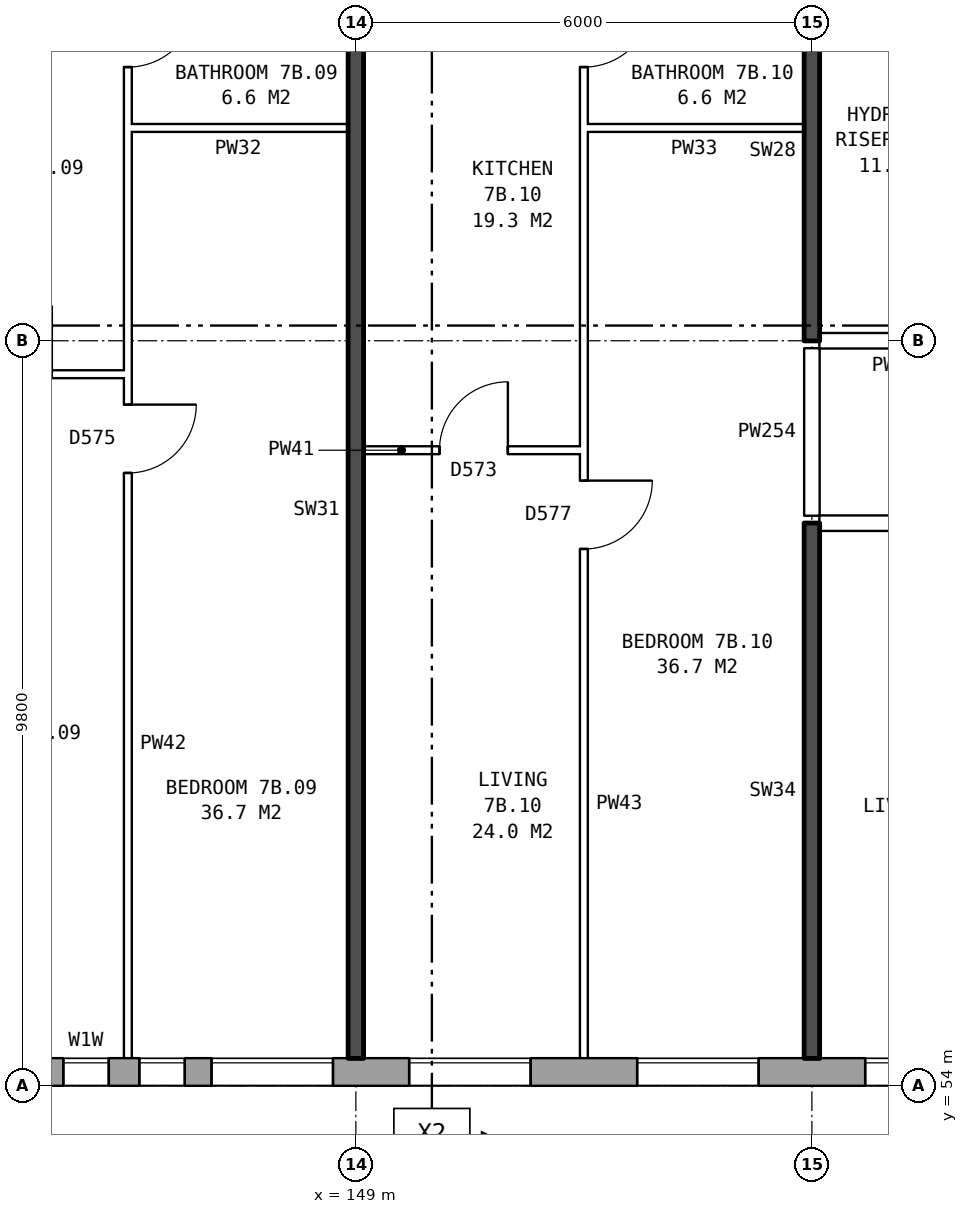
"""IFC4 building model, lengths in metres.
Left out: names, types, materials, properties, quantities, classifications, styles, units other than length and angle.
Written with IfcOpenShell. Run it as: python <this file> out.ifc"""

import sys

from ifc_helpers import new_model, si_unit, direction, frame, frame_2d, origin, place, context, subcontext, project, spatial, rectangle, extrude, element, fill, save


model = new_model("IFC4")
c1 = context("Model", 3, precision=1e-05, world=origin(), true_north=direction((0.0, 1.0)))
c2 = subcontext(c1, "Body", "Model", "MODEL_VIEW")
j1 = project(units=[si_unit("LENGTHUNIT", "METRE"), si_unit("PLANEANGLEUNIT", "RADIAN")], contexts=[c1])
p1 = place(None, origin())
s1 = spatial("IfcSite", under=j1, at=p1, CompositionType="ELEMENT")
p2 = place(p1, origin())
s2 = spatial("IfcBuilding", under=s1, at=p2, CompositionType="ELEMENT")
p3 = place(p2, frame((0.0, 0.0, 28.8)))
s3 = spatial("IfcBuildingStorey", under=s2, at=p3, CompositionType="ELEMENT", Elevation=28.8)
p4 = place(p3, frame((134.075, 54.18, 0.0), z_axis=(0.0, 0.0, 1.0), x_axis=(1.0, 0.0, 0.0)))
e1 = element("IfcWall", 1, at=p4, inside=s3, PredefinedType="STANDARD", context=c2, shape_type="SweptSolid", body=[
    extrude(rectangle(XDim=40.601, YDim=0.36, at=frame_2d((20.3, 0.0))), origin(), (0.0, 0.0, 1.0), 2.85),
])
p5 = place(p4, frame((0.625, 0.0, 0.8)))
e2 = element("IfcOpeningElement", 2, at=p5, cuts=e1, PredefinedType="OPENING", context=c2, shape_type="SweptSolid", body=[
    extrude(rectangle(XDim=1.6, YDim=1.8, at=frame_2d((0.8, 0.9))), frame((0.0, 0.19, 0.0), z_axis=(0.0, -1.0, 0.0), x_axis=(1.0, 0.0, 0.0)), (0.0, 0.0, 1.0), 0.38),
])
p6 = place(p4, frame((3.625, 0.0, 0.8)))
e3 = element("IfcOpeningElement", 3, at=p6, cuts=e1, PredefinedType="OPENING", context=c2, shape_type="SweptSolid", body=[
    extrude(rectangle(XDim=1.6, YDim=1.8, at=frame_2d((0.8, 0.9))), frame((0.0, 0.19, 0.0), z_axis=(0.0, -1.0, 0.0), x_axis=(1.0, 0.0, 0.0)), (0.0, 0.0, 1.0), 0.38),
])
p7 = place(p4, frame((6.625, 0.0, 0.8)))
e4 = element("IfcOpeningElement", 4, at=p7, cuts=e1, PredefinedType="OPENING", context=c2, shape_type="SweptSolid", body=[
    extrude(rectangle(XDim=1.6, YDim=1.8, at=frame_2d((0.8, 0.9))), frame((0.0, 0.19, 0.0), z_axis=(0.0, -1.0, 0.0), x_axis=(1.0, 0.0, 0.0)), (0.0, 0.0, 1.0), 0.38),
])
p8 = place(p4, frame((9.125, 0.0, 1.65)))
e5 = element("IfcOpeningElement", 5, at=p8, cuts=e1, PredefinedType="OPENING", context=c2, shape_type="SweptSolid", body=[
    extrude(rectangle(XDim=1.4, YDim=0.9, at=frame_2d((0.7, 0.45))), frame((0.0, 0.19, 0.0), z_axis=(0.0, -1.0, 0.0), x_axis=(1.0, 0.0, 0.0)), (0.0, 0.0, 1.0), 0.38),
])
p9 = place(p4, frame((12.075, 0.0, 0.8)))
e6 = element("IfcOpeningElement", 6, at=p9, cuts=e1, PredefinedType="OPENING", context=c2, shape_type="SweptSolid", body=[
    extrude(rectangle(XDim=0.6, YDim=0.9, at=frame_2d((0.3, 0.45))), frame((0.0, 0.19, 0.0), z_axis=(0.0, -1.0, 0.0), x_axis=(1.0, 0.0, 0.0)), (0.0, 0.0, 1.0), 0.38),
])
p10 = place(p4, frame((15.625, 0.0, 0.8)))
e7 = element("IfcOpeningElement", 7, at=p10, cuts=e1, PredefinedType="OPENING", context=c2, shape_type="SweptSolid", body=[
    extrude(rectangle(XDim=1.6, YDim=1.8, at=frame_2d((0.8, 0.9))), frame((0.0, 0.19, 0.0), z_axis=(0.0, -1.0, 0.0), x_axis=(1.0, 0.0, 0.0)), (0.0, 0.0, 1.0), 0.38),
])
p11 = place(p4, frame((18.625, 0.0, 0.8)))
e8 = element("IfcOpeningElement", 8, at=p11, cuts=e1, PredefinedType="OPENING", context=c2, shape_type="SweptSolid", body=[
    extrude(rectangle(XDim=1.6, YDim=1.8, at=frame_2d((0.8, 0.9))), frame((0.0, 0.19, 0.0), z_axis=(0.0, -1.0, 0.0), x_axis=(1.0, 0.0, 0.0)), (0.0, 0.0, 1.0), 0.38),
])
p12 = place(p4, frame((21.625, 0.0, 0.8)))
e9 = element("IfcOpeningElement", 9, at=p12, cuts=e1, PredefinedType="OPENING", context=c2, shape_type="SweptSolid", body=[
    extrude(rectangle(XDim=1.6, YDim=1.8, at=frame_2d((0.8, 0.9))), frame((0.0, 0.19, 0.0), z_axis=(0.0, -1.0, 0.0), x_axis=(1.0, 0.0, 0.0)), (0.0, 0.0, 1.0), 0.38),
])
p13 = place(p4, frame((24.625, 0.0, 0.8)))
e10 = element("IfcOpeningElement", 10, at=p13, cuts=e1, PredefinedType="OPENING", context=c2, shape_type="SweptSolid", body=[
    extrude(rectangle(XDim=1.6, YDim=1.8, at=frame_2d((0.8, 0.9))), frame((0.0, 0.19, 0.0), z_axis=(0.0, -1.0, 0.0), x_axis=(1.0, 0.0, 0.0)), (0.0, 0.0, 1.0), 0.38),
])
p14 = place(p4, frame((27.125, 0.0, 0.65)))
e11 = element("IfcOpeningElement", 11, at=p14, cuts=e1, PredefinedType="OPENING", context=c2, shape_type="SweptSolid", body=[
    extrude(rectangle(XDim=0.6, YDim=1.8, at=frame_2d((0.3, 0.9))), frame((0.0, 0.19, 0.0), z_axis=(0.0, -1.0, 0.0), x_axis=(1.0, 0.0, 0.0)), (0.0, 0.0, 1.0), 0.38),
])
p15 = place(p4, frame((30.125, 0.0, 1.6)))
e12 = element("IfcOpeningElement", 12, at=p15, cuts=e1, PredefinedType="OPENING", context=c2, shape_type="SweptSolid", body=[
    extrude(rectangle(XDim=0.6, YDim=0.9, at=frame_2d((0.3, 0.45))), frame((0.0, 0.19, 0.0), z_axis=(0.0, -1.0, 0.0), x_axis=(1.0, 0.0, 0.0)), (0.0, 0.0, 1.0), 0.38),
])
p16 = place(p4, frame((33.625, 0.0, 0.8)))
e13 = element("IfcOpeningElement", 13, at=p16, cuts=e1, PredefinedType="OPENING", context=c2, shape_type="SweptSolid", body=[
    extrude(rectangle(XDim=1.6, YDim=1.8, at=frame_2d((0.8, 0.9))), frame((0.0, 0.19, 0.0), z_axis=(0.0, -1.0, 0.0), x_axis=(1.0, 0.0, 0.0)), (0.0, 0.0, 1.0), 0.38),
])
p17 = place(p4, frame((36.625, 0.0, 0.8)))
e14 = element("IfcOpeningElement", 14, at=p17, cuts=e1, PredefinedType="OPENING", context=c2, shape_type="SweptSolid", body=[
    extrude(rectangle(XDim=1.6, YDim=1.8, at=frame_2d((0.8, 0.9))), frame((0.0, 0.19, 0.0), z_axis=(0.0, -1.0, 0.0), x_axis=(1.0, 0.0, 0.0)), (0.0, 0.0, 1.0), 0.38),
])
p18 = place(p4, frame((11.075, 0.0, 0.15)))
e15 = element("IfcOpeningElement", 15, at=p18, cuts=e1, PredefinedType="OPENING", context=c2, shape_type="SweptSolid", body=[
    extrude(rectangle(XDim=0.6, YDim=0.9, at=frame_2d((0.3, 0.45))), frame((0.0, 0.19, 0.0), z_axis=(0.0, -1.0, 0.0), x_axis=(1.0, 0.0, 0.0)), (0.0, 0.0, 1.0), 0.38),
])
p19 = place(p4, frame((13.025, 0.0, 0.8)))
e16 = element("IfcOpeningElement", 16, at=p19, cuts=e1, PredefinedType="OPENING", context=c2, shape_type="SweptSolid", body=[
    extrude(rectangle(XDim=1.6, YDim=1.8, at=frame_2d((0.8, 0.9))), frame((0.0, 0.19, 0.0), z_axis=(0.0, -1.0, 0.0), x_axis=(1.0, 0.0, 0.0)), (0.0, 0.0, 1.0), 0.38),
])
p20 = place(p4, frame((28.025, 0.0, 0.65)))
e17 = element("IfcOpeningElement", 17, at=p20, cuts=e1, PredefinedType="OPENING", context=c2, shape_type="SweptSolid", body=[
    extrude(rectangle(XDim=0.8, YDim=0.9, at=frame_2d((0.4, 0.45))), frame((0.0, 0.19, 0.0), z_axis=(0.0, -1.0, 0.0), x_axis=(1.0, 0.0, 0.0)), (0.0, 0.0, 1.0), 0.38),
])
p21 = place(p4, frame((31.075, 0.0, 0.8)))
e18 = element("IfcOpeningElement", 18, at=p21, cuts=e1, PredefinedType="OPENING", context=c2, shape_type="SweptSolid", body=[
    extrude(rectangle(XDim=1.6, YDim=1.8, at=frame_2d((0.8, 0.9))), frame((0.0, 0.19, 0.0), z_axis=(0.0, -1.0, 0.0), x_axis=(1.0, 0.0, 0.0)), (0.0, 0.0, 1.0), 0.38),
])
p22 = place(p3, frame((155.1, 61.4, 0.0), z_axis=(0.0, 0.0, 1.0), x_axis=(1.0, 0.0, 0.0)))
e19 = element("IfcWall", 19, at=p22, inside=s3, PredefinedType="PARTITIONING", context=c2, shape_type="SweptSolid", body=[
    extrude(rectangle(XDim=22.29, YDim=0.2, at=frame_2d((11.145, 0.0))), origin(), (0.0, 0.0, 1.0), 2.85),
])
p23 = place(p22, frame((2.45, 0.0, 0.0)))
e20 = element("IfcOpeningElement", 20, at=p23, cuts=e19, PredefinedType="OPENING", context=c2, shape_type="SweptSolid", body=[
    extrude(rectangle(XDim=1.0, YDim=2.1, at=frame_2d((0.5, 1.05))), frame((0.0, 0.11, 0.0), z_axis=(0.0, -1.0, 0.0), x_axis=(1.0, 0.0, 0.0)), (0.0, 0.0, 1.0), 0.22),
])
p24 = place(p22, frame((14.4, 0.0, 0.0)))
e21 = element("IfcOpeningElement", 21, at=p24, cuts=e19, PredefinedType="OPENING", context=c2, shape_type="SweptSolid", body=[
    extrude(rectangle(XDim=1.0, YDim=2.1, at=frame_2d((0.5, 1.05))), frame((0.0, 0.11, 0.0), z_axis=(0.0, -1.0, 0.0), x_axis=(1.0, 0.0, 0.0)), (0.0, 0.0, 1.0), 0.22),
])
p25 = place(p3, frame((149.1, 62.36, 0.0), z_axis=(0.0, 0.0, 1.0), x_axis=(1.0, 0.0, 0.0)))
e22 = element("IfcWall", 22, at=p25, inside=s3, PredefinedType="PARTITIONING", context=c2, shape_type="SweptSolid", body=[
    extrude(rectangle(XDim=2.9, YDim=0.1, at=frame_2d((1.45, 0.0))), origin(), (0.0, 0.0, 1.0), 2.85),
])
p26 = place(p25, frame((1.0, 0.0, 0.0)))
e23 = element("IfcOpeningElement", 23, at=p26, cuts=e22, PredefinedType="OPENING", context=c2, shape_type="SweptSolid", body=[
    extrude(rectangle(XDim=0.9, YDim=2.1, at=frame_2d((0.45, 1.05))), frame((0.0, 0.06, 0.0), z_axis=(0.0, -1.0, 0.0), x_axis=(1.0, 0.0, 0.0)), (0.0, 0.0, 1.0), 0.12),
])
p27 = place(p3, frame((143.1, 63.36, 0.0), z_axis=(0.0, 0.0, 1.0), x_axis=(1.0, 0.0, 0.0)))
e24 = element("IfcWall", 24, at=p27, inside=s3, PredefinedType="PARTITIONING", context=c2, shape_type="SweptSolid", body=[
    extrude(rectangle(XDim=2.9, YDim=0.1, at=frame_2d((1.45, 0.0))), origin(), (0.0, 0.0, 1.0), 2.85),
])
p28 = place(p27, frame((1.0, 0.0, 0.0)))
e25 = element("IfcOpeningElement", 25, at=p28, cuts=e24, PredefinedType="OPENING", context=c2, shape_type="SweptSolid", body=[
    extrude(rectangle(XDim=0.9, YDim=2.1, at=frame_2d((0.45, 1.05))), frame((0.0, 0.06, 0.0), z_axis=(0.0, -1.0, 0.0), x_axis=(1.0, 0.0, 0.0)), (0.0, 0.0, 1.0), 0.12),
])
p29 = place(p3, frame((155.1, 63.8, 0.0), z_axis=(0.0, 0.0, 1.0), x_axis=(1.0, 0.0, 0.0)))
e26 = element("IfcWall", 26, at=p29, inside=s3, PredefinedType="PARTITIONING", context=c2, shape_type="SweptSolid", body=[
    extrude(rectangle(XDim=2.14, YDim=0.2, at=frame_2d((1.07, 0.0))), origin(), (0.0, 0.0, 1.0), 2.85),
])
for number, where, z_axis, x_axis in (
    (27, (146.0, 66.6, 0.0), (0.0, 0.0, 1.0), (1.0, 0.0, 0.0)),
    (28, (152.0, 66.6, 0.0), (0.0, 0.0, 1.0), (1.0, 0.0, 0.0)),
):
    element("IfcWall", number, at=place(p3, frame(where, z_axis=z_axis, x_axis=x_axis)), inside=s3, PredefinedType="PARTITIONING", context=c2, shape_type="SweptSolid", body=[
        extrude(rectangle(XDim=2.9, YDim=0.1, at=frame_2d((1.45, 0.0))), origin(), (0.0, 0.0, 1.0), 2.85),
    ])
p30 = place(p3, frame((146.0, 54.36, 0.0), z_axis=(0.0, 0.0, 1.0), x_axis=(0.0, 1.0, 0.0)))
e29 = element("IfcWall", 29, at=p30, inside=s3, PredefinedType="PARTITIONING", context=c2, shape_type="SweptSolid", body=[
    extrude(rectangle(XDim=14.34, YDim=0.1, at=frame_2d((7.17, 0.0))), origin(), (0.0, 0.0, 1.0), 2.85),
])
p31 = place(p30, frame((7.7, 0.0, 0.0)))
e30 = element("IfcOpeningElement", 30, at=p31, cuts=e29, PredefinedType="OPENING", context=c2, shape_type="SweptSolid", body=[
    extrude(rectangle(XDim=0.9, YDim=2.1, at=frame_2d((0.45, 1.05))), frame((0.0, 0.06, 0.0), z_axis=(0.0, -1.0, 0.0), x_axis=(1.0, 0.0, 0.0)), (0.0, 0.0, 1.0), 0.12),
])
p32 = place(p30, frame((13.04, 0.0, 0.0)))
e31 = element("IfcOpeningElement", 31, at=p32, cuts=e29, PredefinedType="OPENING", context=c2, shape_type="SweptSolid", body=[
    extrude(rectangle(XDim=0.9, YDim=2.1, at=frame_2d((0.45, 1.05))), frame((0.0, 0.06, 0.0), z_axis=(0.0, -1.0, 0.0), x_axis=(1.0, 0.0, 0.0)), (0.0, 0.0, 1.0), 0.12),
])
p33 = place(p3, frame((149.0, 54.36, 0.0), z_axis=(0.0, 0.0, 1.0), x_axis=(0.0, 1.0, 0.0)))
e32 = element("IfcWall", 32, at=p33, inside=s3, PredefinedType="SOLIDWALL", context=c2, shape_type="SweptSolid", body=[
    extrude(rectangle(XDim=14.44, YDim=0.2, at=frame_2d((7.22, 0.0))), origin(), (0.0, 0.0, 1.0), 2.85),
])
p34 = place(p3, frame((152.0, 54.36, 0.0), z_axis=(0.0, 0.0, 1.0), x_axis=(0.0, 1.0, 0.0)))
e33 = element("IfcWall", 33, at=p34, inside=s3, PredefinedType="PARTITIONING", context=c2, shape_type="SweptSolid", body=[
    extrude(rectangle(XDim=14.34, YDim=0.1, at=frame_2d((7.17, 0.0))), origin(), (0.0, 0.0, 1.0), 2.85),
])
p35 = place(p34, frame((6.7, 0.0, 0.0)))
e34 = element("IfcOpeningElement", 34, at=p35, cuts=e33, PredefinedType="OPENING", context=c2, shape_type="SweptSolid", body=[
    extrude(rectangle(XDim=0.9, YDim=2.1, at=frame_2d((0.45, 1.05))), frame((0.0, 0.06, 0.0), z_axis=(0.0, -1.0, 0.0), x_axis=(1.0, 0.0, 0.0)), (0.0, 0.0, 1.0), 0.12),
])
p36 = place(p34, frame((13.04, 0.0, 0.0)))
e35 = element("IfcOpeningElement", 35, at=p36, cuts=e33, PredefinedType="OPENING", context=c2, shape_type="SweptSolid", body=[
    extrude(rectangle(XDim=0.9, YDim=2.1, at=frame_2d((0.45, 1.05))), frame((0.0, 0.06, 0.0), z_axis=(0.0, -1.0, 0.0), x_axis=(1.0, 0.0, 0.0)), (0.0, 0.0, 1.0), 0.12),
])
p37 = place(p3, frame((155.0, 54.36, 0.0), z_axis=(0.0, 0.0, 1.0), x_axis=(0.0, 1.0, 0.0)))
e36 = element("IfcWall", 36, at=p37, inside=s3, PredefinedType="SOLIDWALL", context=c2, shape_type="SweptSolid", body=[
    extrude(rectangle(XDim=7.04, YDim=0.2, at=frame_2d((3.52, 0.0))), origin(), (0.0, 0.0, 1.0), 2.85),
])
p38 = place(p3, frame((155.0, 61.5, 0.0), z_axis=(0.0, 0.0, 1.0), x_axis=(0.0, 1.0, 0.0)))
e37 = element("IfcWall", 37, at=p38, inside=s3, PredefinedType="PARTITIONING", context=c2, shape_type="SweptSolid", body=[
    extrude(rectangle(XDim=2.2, YDim=0.2, at=frame_2d((1.1, 0.0))), origin(), (0.0, 0.0, 1.0), 2.85),
])
p39 = place(p3, frame((155.0, 63.8, 0.0), z_axis=(0.0, 0.0, 1.0), x_axis=(0.0, 1.0, 0.0)))
e38 = element("IfcWall", 38, at=p39, inside=s3, PredefinedType="SOLIDWALL", context=c2, shape_type="SweptSolid", body=[
    extrude(rectangle(XDim=5.0, YDim=0.2, at=frame_2d((2.5, 0.0))), origin(), (0.0, 0.0, 1.0), 2.85),
])
p40 = place(p9, origin())
e39 = element("IfcWindow", 39, at=p40, inside=s3, PartitioningType="SINGLE_PANEL", PredefinedType="WINDOW", context=c2, shape_type="SweptSolid", body=[
    extrude(rectangle(XDim=0.6, YDim=0.9, at=frame_2d((0.3, 0.45))), frame((0.0, 0.15, 0.0), z_axis=(0.0, -1.0, 0.0), x_axis=(1.0, 0.0, 0.0)), (0.0, 0.0, 1.0), 0.06),
])
fill(e6, e39)
p41 = place(p10, origin())
e40 = element("IfcWindow", 40, at=p41, inside=s3, PartitioningType="SINGLE_PANEL", PredefinedType="WINDOW", context=c2, shape_type="SweptSolid", body=[
    extrude(rectangle(XDim=1.6, YDim=1.8, at=frame_2d((0.8, 0.9))), frame((0.0, 0.15, 0.0), z_axis=(0.0, -1.0, 0.0), x_axis=(1.0, 0.0, 0.0)), (0.0, 0.0, 1.0), 0.06),
])
fill(e7, e40)
p42 = place(p11, origin())
e41 = element("IfcWindow", 41, at=p42, inside=s3, PartitioningType="SINGLE_PANEL", PredefinedType="WINDOW", context=c2, shape_type="SweptSolid", body=[
    extrude(rectangle(XDim=1.6, YDim=1.8, at=frame_2d((0.8, 0.9))), frame((0.0, 0.15, 0.0), z_axis=(0.0, -1.0, 0.0), x_axis=(1.0, 0.0, 0.0)), (0.0, 0.0, 1.0), 0.06),
])
fill(e8, e41)
p43 = place(p12, origin())
e42 = element("IfcWindow", 42, at=p43, inside=s3, PartitioningType="SINGLE_PANEL", PredefinedType="WINDOW", context=c2, shape_type="SweptSolid", body=[
    extrude(rectangle(XDim=1.6, YDim=1.8, at=frame_2d((0.8, 0.9))), frame((0.0, 0.15, 0.0), z_axis=(0.0, -1.0, 0.0), x_axis=(1.0, 0.0, 0.0)), (0.0, 0.0, 1.0), 0.06),
])
fill(e9, e42)
p44 = place(p31, frame((0.9, 0.0, 0.0), z_axis=(0.0, 0.0, 1.0), x_axis=(-1.0, 0.0, 0.0)))
e43 = element("IfcDoor", 43, at=p44, inside=s3, OperationType="SINGLE_SWING_LEFT", PredefinedType="DOOR", context=c2, shape_type="SweptSolid", body=[
    extrude(rectangle(XDim=0.9, YDim=2.1, at=frame_2d((0.45, 1.05))), frame((0.0, 0.025, 0.0), z_axis=(0.0, -1.0, 0.0), x_axis=(1.0, 0.0, 0.0)), (0.0, 0.0, 1.0), 0.05),
])
fill(e30, e43)
p45 = place(p32, frame((0.9, 0.0, 0.0), z_axis=(0.0, 0.0, 1.0), x_axis=(-1.0, 0.0, 0.0)))
e44 = element("IfcDoor", 44, at=p45, inside=s3, OperationType="SINGLE_SWING_LEFT", PredefinedType="DOOR", context=c2, shape_type="SweptSolid", body=[
    extrude(rectangle(XDim=0.9, YDim=2.1, at=frame_2d((0.45, 1.05))), frame((0.0, 0.025, 0.0), z_axis=(0.0, -1.0, 0.0), x_axis=(1.0, 0.0, 0.0)), (0.0, 0.0, 1.0), 0.05),
])
fill(e31, e44)
p46 = place(p35, frame((0.9, 0.0, 0.0), z_axis=(0.0, 0.0, 1.0), x_axis=(-1.0, 0.0, 0.0)))
e45 = element("IfcDoor", 45, at=p46, inside=s3, OperationType="SINGLE_SWING_LEFT", PredefinedType="DOOR", context=c2, shape_type="SweptSolid", body=[
    extrude(rectangle(XDim=0.9, YDim=2.1, at=frame_2d((0.45, 1.05))), frame((0.0, 0.025, 0.0), z_axis=(0.0, -1.0, 0.0), x_axis=(1.0, 0.0, 0.0)), (0.0, 0.0, 1.0), 0.05),
])
fill(e34, e45)
p47 = place(p26, origin())
e46 = element("IfcDoor", 46, at=p47, inside=s3, OperationType="SINGLE_SWING_RIGHT", PredefinedType="DOOR", context=c2, shape_type="SweptSolid", body=[
    extrude(rectangle(XDim=0.9, YDim=2.1, at=frame_2d((0.45, 1.05))), frame((0.0, 0.025, 0.0), z_axis=(0.0, -1.0, 0.0), x_axis=(1.0, 0.0, 0.0)), (0.0, 0.0, 1.0), 0.05),
])
fill(e23, e46)
p48 = place(p36, frame((0.9, 0.0, 0.0), z_axis=(0.0, 0.0, 1.0), x_axis=(-1.0, 0.0, 0.0)))
e47 = element("IfcDoor", 47, at=p48, inside=s3, OperationType="SINGLE_SWING_LEFT", PredefinedType="DOOR", context=c2, shape_type="SweptSolid", body=[
    extrude(rectangle(XDim=0.9, YDim=2.1, at=frame_2d((0.45, 1.05))), frame((0.0, 0.025, 0.0), z_axis=(0.0, -1.0, 0.0), x_axis=(1.0, 0.0, 0.0)), (0.0, 0.0, 1.0), 0.05),
])
fill(e35, e47)
p49 = place(p18, origin())
e48 = element("IfcWindow", 48, at=p49, inside=s3, PartitioningType="SINGLE_PANEL", PredefinedType="WINDOW", context=c2, shape_type="SweptSolid", body=[
    extrude(rectangle(XDim=0.6, YDim=0.9, at=frame_2d((0.3, 0.45))), frame((0.0, 0.15, 0.0), z_axis=(0.0, -1.0, 0.0), x_axis=(1.0, 0.0, 0.0)), (0.0, 0.0, 1.0), 0.06),
])
fill(e15, e48)
p50 = place(p19, origin())
e49 = element("IfcWindow", 49, at=p50, inside=s3, PartitioningType="SINGLE_PANEL", PredefinedType="WINDOW", context=c2, shape_type="SweptSolid", body=[
    extrude(rectangle(XDim=1.6, YDim=1.8, at=frame_2d((0.8, 0.9))), frame((0.0, 0.15, 0.0), z_axis=(0.0, -1.0, 0.0), x_axis=(1.0, 0.0, 0.0)), (0.0, 0.0, 1.0), 0.06),
])
fill(e16, e49)
save(model, sys.argv[1])
